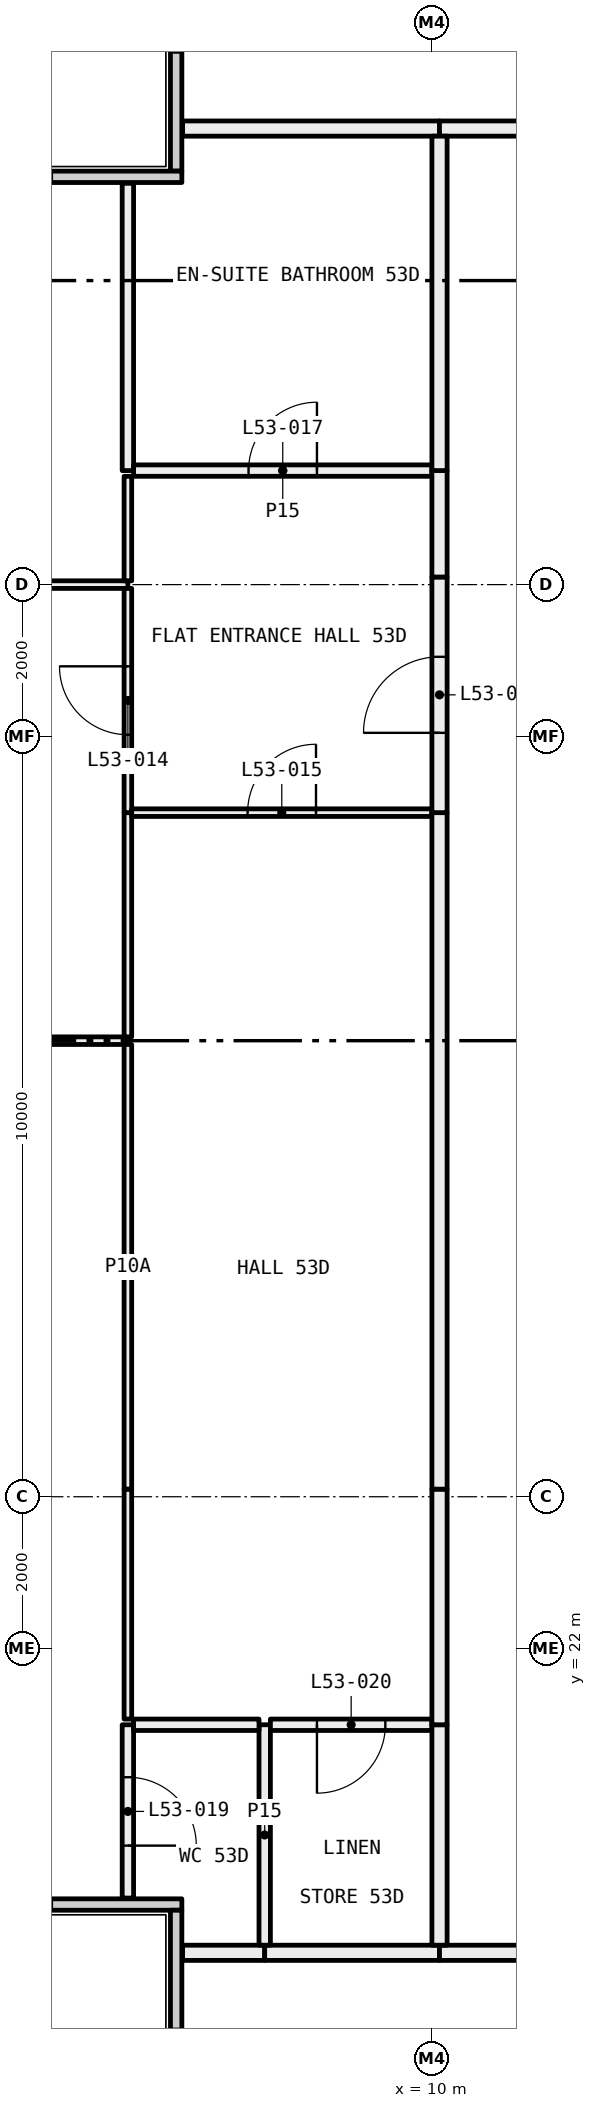
"""IFC4 building model, lengths in metres.
Left out: names, types, materials, properties, quantities, classifications, styles, units other than length and angle.
Written with IfcOpenShell. Run it as: python <this file> out.ifc"""

import sys

from ifc_helpers import new_model, si_unit, direction, frame, frame_2d, origin, place, context, subcontext, project, spatial, rectangle, extrude, element, fill, save


model = new_model("IFC4")
c1 = context("Model", 3, precision=1e-05, world=origin(), true_north=direction((0.0, 1.0)))
c2 = subcontext(c1, "Body", "Model", "MODEL_VIEW")
j1 = project(units=[si_unit("LENGTHUNIT", "METRE"), si_unit("PLANEANGLEUNIT", "RADIAN")], contexts=[c1])
p1 = place(None, origin())
s1 = spatial("IfcSite", under=j1, at=p1, CompositionType="ELEMENT")
p2 = place(p1, origin())
s2 = spatial("IfcBuilding", under=s1, at=p2, CompositionType="ELEMENT")
p3 = place(p2, frame((0.0, 0.0, 199.65)))
s3 = spatial("IfcBuildingStorey", under=s2, at=p3, CompositionType="ELEMENT", Elevation=199.65)
p4 = place(p3, frame((6.635, 41.44, 0.0), z_axis=(0.0, 0.0, 1.0), x_axis=(0.0, 1.0, 0.0)))
e1 = element("IfcWall", 1, at=p4, inside=s3, PredefinedType="ELEMENTEDWALL", context=c2, shape_type="SweptSolid", body=[
    extrude(rectangle(XDim=5.85, YDim=0.15, at=frame_2d((2.925, 0.0))), origin(), (0.0, 0.0, 1.0), 3.05),
])
p5 = place(p4, frame((1.56, 0.0, 0.45)))
e2 = element("IfcOpeningElement", 2, at=p5, cuts=e1, PredefinedType="OPENING", context=c2, shape_type="SweptSolid", body=[
    extrude(rectangle(XDim=4.0, YDim=2.55, at=frame_2d((2.0, 1.275))), frame((0.0, 0.085, 0.0), z_axis=(0.0, -1.0, 0.0), x_axis=(1.0, 0.0, 0.0)), (0.0, 0.0, 1.0), 0.17),
])
p6 = place(p3, frame((0.56, 41.365, 0.0), z_axis=(0.0, 0.0, 1.0), x_axis=(1.0, 0.0, 0.0)))
e3 = element("IfcWall", 3, at=p6, inside=s3, PredefinedType="ELEMENTEDWALL", context=c2, shape_type="SweptSolid", body=[
    extrude(rectangle(XDim=6.15, YDim=0.15, at=frame_2d((3.075, 0.0))), origin(), (0.0, 0.0, 1.0), 3.05),
])
p7 = place(p6, frame((0.44, 0.0, 0.45)))
e4 = element("IfcOpeningElement", 4, at=p7, cuts=e3, PredefinedType="OPENING", context=c2, shape_type="SweptSolid", body=[
    extrude(rectangle(XDim=4.0, YDim=2.55, at=frame_2d((2.0, 1.275))), frame((0.0, 0.085, 0.0), z_axis=(0.0, -1.0, 0.0), x_axis=(1.0, 0.0, 0.0)), (0.0, 0.0, 1.0), 0.17),
])
p8 = place(p3, frame((0.56, 18.635, 0.0), z_axis=(0.0, 0.0, 1.0), x_axis=(1.0, 0.0, 0.0)))
e5 = element("IfcWall", 5, at=p8, inside=s3, PredefinedType="ELEMENTEDWALL", context=c2, shape_type="SweptSolid", body=[
    extrude(rectangle(XDim=6.15, YDim=0.15, at=frame_2d((3.075, 0.0))), origin(), (0.0, 0.0, 1.0), 3.05),
])
p9 = place(p8, frame((0.44, 0.0, 0.45)))
e6 = element("IfcOpeningElement", 6, at=p9, cuts=e5, PredefinedType="OPENING", context=c2, shape_type="SweptSolid", body=[
    extrude(rectangle(XDim=4.0, YDim=2.55, at=frame_2d((2.0, 1.275))), frame((0.0, 0.085, 0.0), z_axis=(0.0, -1.0, 0.0), x_axis=(1.0, 0.0, 0.0)), (0.0, 0.0, 1.0), 0.17),
])
p10 = place(p3, frame((6.635, 12.71, 0.0), z_axis=(0.0, 0.0, 1.0), x_axis=(0.0, 1.0, 0.0)))
e7 = element("IfcWall", 7, at=p10, inside=s3, PredefinedType="ELEMENTEDWALL", context=c2, shape_type="SweptSolid", body=[
    extrude(rectangle(XDim=5.85, YDim=0.15, at=frame_2d((2.925, 0.0))), origin(), (0.0, 0.0, 1.0), 3.05),
])
p11 = place(p10, frame((0.29, 0.0, 0.45)))
e8 = element("IfcOpeningElement", 8, at=p11, cuts=e7, PredefinedType="OPENING", context=c2, shape_type="SweptSolid", body=[
    extrude(rectangle(XDim=4.0, YDim=2.55, at=frame_2d((2.0, 1.275))), frame((0.0, 0.085, 0.0), z_axis=(0.0, -1.0, 0.0), x_axis=(1.0, 0.0, 0.0)), (0.0, 0.0, 1.0), 0.17),
])
p12 = place(p3, frame((7.8, 18.0, 0.0), z_axis=(0.0, 0.0, 1.0), x_axis=(-1.0, 0.0, 0.0)))
e9 = element("IfcWall", 9, at=p12, inside=s3, PredefinedType="PARTITIONING", context=c2, shape_type="SweptSolid", body=[
    extrude(rectangle(XDim=1.08, YDim=0.2, at=frame_2d((0.54, 0.0))), origin(), (0.0, 0.0, 1.0), 3.05),
])
p13 = place(p3, frame((10.1, 18.0, 0.0), z_axis=(0.0, 0.0, 1.0), x_axis=(-1.0, 0.0, 0.0)))
e10 = element("IfcWall", 10, at=p13, inside=s3, PredefinedType="PARTITIONING", context=c2, shape_type="SweptSolid", body=[
    extrude(rectangle(XDim=2.3, YDim=0.2, at=frame_2d((1.15, 0.0))), origin(), (0.0, 0.0, 1.0), 3.05),
])
p14 = place(p3, frame((12.0, 18.0, 0.0), z_axis=(0.0, 0.0, 1.0), x_axis=(-1.0, 0.0, 0.0)))
e11 = element("IfcWall", 11, at=p14, inside=s3, PredefinedType="PARTITIONING", context=c2, shape_type="SweptSolid", body=[
    extrude(rectangle(XDim=1.9, YDim=0.2, at=frame_2d((0.95, 0.0))), origin(), (0.0, 0.0, 1.0), 3.05),
])
p15 = place(p3, frame((6.72, 42.0, 0.0), z_axis=(0.0, 0.0, 1.0), x_axis=(1.0, 0.0, 0.0)))
e12 = element("IfcWall", 12, at=p15, inside=s3, PredefinedType="PARTITIONING", context=c2, shape_type="SweptSolid", body=[
    extrude(rectangle(XDim=3.38, YDim=0.2, at=frame_2d((1.69, 0.0))), origin(), (0.0, 0.0, 1.0), 3.05),
])
p16 = place(p3, frame((10.1, 42.0, 0.0), z_axis=(0.0, 0.0, 1.0), x_axis=(1.0, 0.0, 0.0)))
e13 = element("IfcWall", 13, at=p16, inside=s3, PredefinedType="PARTITIONING", context=c2, shape_type="SweptSolid", body=[
    extrude(rectangle(XDim=7.9, YDim=0.2, at=frame_2d((3.95, 0.0))), origin(), (0.0, 0.0, 1.0), 3.05),
])
p17 = place(p3, frame((6.0, 30.0, 0.0), z_axis=(0.0, 0.0, 1.0), x_axis=(-1.0, 0.0, 0.0)))
e14 = element("IfcWall", 14, at=p17, inside=s3, PredefinedType="PARTITIONING", context=c2, shape_type="SweptSolid", body=[
    extrude(rectangle(XDim=5.28, YDim=0.1, at=frame_2d((2.64, 0.0))), origin(), (0.0, 0.0, 1.0), 3.05),
])
p18 = place(p17, frame((2.19, 0.0, 0.0)))
e15 = element("IfcOpeningElement", 15, at=p18, cuts=e14, PredefinedType="OPENING", context=c2, shape_type="SweptSolid", body=[
    extrude(rectangle(XDim=0.9, YDim=2.1, at=frame_2d((0.45, 1.05))), frame((0.0, 0.06, 0.0), z_axis=(0.0, -1.0, 0.0), x_axis=(1.0, 0.0, 0.0)), (0.0, 0.0, 1.0), 0.12),
])
p19 = place(p3, frame((6.0, 18.72, 0.0), z_axis=(0.0, 0.0, 1.0), x_axis=(0.0, 1.0, 0.0)))
e16 = element("IfcWall", 16, at=p19, inside=s3, PredefinedType="PARTITIONING", context=c2, shape_type="SweptSolid", body=[
    extrude(rectangle(XDim=2.28, YDim=0.15, at=frame_2d((1.14, 0.0))), origin(), (0.0, 0.0, 1.0), 3.05),
])
p20 = place(p19, frame((0.69, 0.0, 0.0)))
e17 = element("IfcOpeningElement", 17, at=p20, cuts=e16, PredefinedType="OPENING", context=c2, shape_type="SweptSolid", body=[
    extrude(rectangle(XDim=0.9, YDim=2.1, at=frame_2d((0.45, 1.05))), frame((0.0, 0.085, 0.0), z_axis=(0.0, -1.0, 0.0), x_axis=(1.0, 0.0, 0.0)), (0.0, 0.0, 1.0), 0.17),
])
p21 = place(p3, frame((6.0, 21.075, 0.0), z_axis=(0.0, 0.0, 1.0), x_axis=(0.0, 1.0, 0.0)))
e18 = element("IfcWall", 18, at=p21, inside=s3, PredefinedType="PARTITIONING", context=c2, shape_type="SweptSolid", body=[
    extrude(rectangle(XDim=3.025, YDim=0.1, at=frame_2d((1.513, 0.0))), origin(), (0.0, 0.0, 1.0), 2.45),
])
p22 = place(p3, frame((6.0, 24.1, 0.0), z_axis=(0.0, 0.0, 1.0), x_axis=(0.0, 1.0, 0.0)))
e19 = element("IfcWall", 19, at=p22, inside=s3, PredefinedType="PARTITIONING", context=c2, shape_type="SweptSolid", body=[
    extrude(rectangle(XDim=5.85, YDim=0.1, at=frame_2d((2.925, 0.0))), origin(), (0.0, 0.0, 1.0), 3.05),
])
p23 = place(p3, frame((6.0, 36.0, 0.0), z_axis=(0.0, 0.0, 1.0), x_axis=(-1.0, 0.0, 0.0)))
e20 = element("IfcWall", 20, at=p23, inside=s3, PredefinedType="PARTITIONING", context=c2, shape_type="SweptSolid", body=[
    extrude(rectangle(XDim=5.28, YDim=0.1, at=frame_2d((2.64, 0.0))), origin(), (0.0, 0.0, 1.0), 2.45),
])
p24 = place(p23, frame((2.19, 0.0, 0.0)))
e21 = element("IfcOpeningElement", 21, at=p24, cuts=e20, PredefinedType="OPENING", context=c2, shape_type="SweptSolid", body=[
    extrude(rectangle(XDim=0.9, YDim=2.1, at=frame_2d((0.45, 1.05))), frame((0.0, 0.06, 0.0), z_axis=(0.0, -1.0, 0.0), x_axis=(1.0, 0.0, 0.0)), (0.0, 0.0, 1.0), 0.12),
])
p25 = place(p3, frame((6.0, 30.05, 0.0), z_axis=(0.0, 0.0, 1.0), x_axis=(0.0, 1.0, 0.0)))
e22 = element("IfcWall", 22, at=p25, inside=s3, PredefinedType="PARTITIONING", context=c2, shape_type="SweptSolid", body=[
    extrude(rectangle(XDim=2.95, YDim=0.1, at=frame_2d((1.475, 0.0))), origin(), (0.0, 0.0, 1.0), 3.05),
])
p26 = place(p3, frame((6.0, 33.0, 0.0), z_axis=(0.0, 0.0, 1.0), x_axis=(0.0, 1.0, 0.0)))
e23 = element("IfcWall", 23, at=p26, inside=s3, PredefinedType="PARTITIONING", context=c2, shape_type="SweptSolid", body=[
    extrude(rectangle(XDim=2.95, YDim=0.1, at=frame_2d((1.475, 0.0))), origin(), (0.0, 0.0, 1.0), 2.45),
])
p27 = place(p26, frame((1.025, 0.0, 0.0)))
e24 = element("IfcOpeningElement", 24, at=p27, cuts=e23, PredefinedType="OPENING", context=c2, shape_type="SweptSolid", body=[
    extrude(rectangle(XDim=0.9, YDim=2.1, at=frame_2d((0.45, 1.05))), frame((0.0, 0.06, 0.0), z_axis=(0.0, -1.0, 0.0), x_axis=(1.0, 0.0, 0.0)), (0.0, 0.0, 1.0), 0.12),
])
p28 = place(p3, frame((6.0, 36.05, 0.0), z_axis=(0.0, 0.0, 1.0), x_axis=(0.0, 1.0, 0.0)))
e25 = element("IfcWall", 25, at=p28, inside=s3, PredefinedType="PARTITIONING", context=c2, shape_type="SweptSolid", body=[
    extrude(rectangle(XDim=1.375, YDim=0.1, at=frame_2d((0.688, 0.0))), origin(), (0.0, 0.0, 1.0), 2.45),
])
p29 = place(p3, frame((6.0, 37.5, 0.0), z_axis=(0.0, 0.0, 1.0), x_axis=(0.0, 1.0, 0.0)))
e26 = element("IfcWall", 26, at=p29, inside=s3, PredefinedType="PARTITIONING", context=c2, shape_type="SweptSolid", body=[
    extrude(rectangle(XDim=3.78, YDim=0.15, at=frame_2d((1.89, 0.0))), origin(), (0.0, 0.0, 1.0), 3.05),
])
p30 = place(p3, frame((7.8, 18.1, 0.0), z_axis=(0.0, 0.0, 1.0), x_axis=(0.0, 1.0, 0.0)))
e27 = element("IfcWall", 27, at=p30, inside=s3, PredefinedType="PARTITIONING", context=c2, shape_type="SweptSolid", body=[
    extrude(rectangle(XDim=2.9, YDim=0.15, at=frame_2d((1.45, 0.0))), origin(), (0.0, 0.0, 1.0), 3.05),
])
p31 = place(p3, frame((7.725, 21.0, 0.0), z_axis=(0.0, 0.0, 1.0), x_axis=(-1.0, 0.0, 0.0)))
e28 = element("IfcWall", 28, at=p31, inside=s3, PredefinedType="PARTITIONING", context=c2, shape_type="SweptSolid", body=[
    extrude(rectangle(XDim=1.65, YDim=0.15, at=frame_2d((0.825, 0.0))), origin(), (0.0, 0.0, 1.0), 3.05),
])
p32 = place(p3, frame((10.0, 21.0, 0.0), z_axis=(0.0, 0.0, 1.0), x_axis=(-1.0, 0.0, 0.0)))
e29 = element("IfcWall", 29, at=p32, inside=s3, PredefinedType="PARTITIONING", context=c2, shape_type="SweptSolid", body=[
    extrude(rectangle(XDim=2.125, YDim=0.15, at=frame_2d((1.062, 0.0))), origin(), (0.0, 0.0, 1.0), 3.05),
])
p33 = place(p32, frame((0.613, 0.0, 0.0)))
e30 = element("IfcOpeningElement", 30, at=p33, cuts=e29, PredefinedType="OPENING", context=c2, shape_type="SweptSolid", body=[
    extrude(rectangle(XDim=0.9, YDim=2.1, at=frame_2d((0.45, 1.05))), frame((0.0, 0.085, 0.0), z_axis=(0.0, -1.0, 0.0), x_axis=(1.0, 0.0, 0.0)), (0.0, 0.0, 1.0), 0.17),
])
p34 = place(p3, frame((10.1, 18.1, 0.0), z_axis=(0.0, 0.0, 1.0), x_axis=(0.0, 1.0, 0.0)))
e31 = element("IfcWall", 31, at=p34, inside=s3, PredefinedType="PARTITIONING", context=c2, shape_type="SweptSolid", body=[
    extrude(rectangle(XDim=2.9, YDim=0.2, at=frame_2d((1.45, 0.0))), origin(), (0.0, 0.0, 1.0), 3.05),
])
p35 = place(p3, frame((10.0, 33.0, 0.0), z_axis=(0.0, 0.0, 1.0), x_axis=(-1.0, 0.0, 0.0)))
e32 = element("IfcWall", 32, at=p35, inside=s3, PredefinedType="PARTITIONING", context=c2, shape_type="SweptSolid", body=[
    extrude(rectangle(XDim=3.95, YDim=0.1, at=frame_2d((1.975, 0.0))), origin(), (0.0, 0.0, 1.0), 3.05),
])
p36 = place(p35, frame((1.525, 0.0, 0.0)))
e33 = element("IfcOpeningElement", 33, at=p36, cuts=e32, PredefinedType="OPENING", context=c2, shape_type="SweptSolid", body=[
    extrude(rectangle(XDim=0.9, YDim=2.1, at=frame_2d((0.45, 1.05))), frame((0.0, 0.06, 0.0), z_axis=(0.0, -1.0, 0.0), x_axis=(1.0, 0.0, 0.0)), (0.0, 0.0, 1.0), 0.12),
])
p37 = place(p3, frame((10.1, 21.0, 0.0), z_axis=(0.0, 0.0, 1.0), x_axis=(0.0, 1.0, 0.0)))
e34 = element("IfcWall", 34, at=p37, inside=s3, PredefinedType="PARTITIONING", context=c2, shape_type="SweptSolid", body=[
    extrude(rectangle(XDim=3.1, YDim=0.2, at=frame_2d((1.55, 0.0))), origin(), (0.0, 0.0, 1.0), 2.45),
])
p38 = place(p3, frame((10.1, 24.1, 0.0), z_axis=(0.0, 0.0, 1.0), x_axis=(0.0, 1.0, 0.0)))
e35 = element("IfcWall", 35, at=p38, inside=s3, PredefinedType="PARTITIONING", context=c2, shape_type="SweptSolid", body=[
    extrude(rectangle(XDim=8.9, YDim=0.2, at=frame_2d((4.45, 0.0))), origin(), (0.0, 0.0, 1.0), 3.05),
])
p39 = place(p3, frame((10.0, 37.5, 0.0), z_axis=(0.0, 0.0, 1.0), x_axis=(-1.0, 0.0, 0.0)))
e36 = element("IfcWall", 36, at=p39, inside=s3, PredefinedType="PARTITIONING", context=c2, shape_type="SweptSolid", body=[
    extrude(rectangle(XDim=3.925, YDim=0.15, at=frame_2d((1.962, 0.0))), origin(), (0.0, 0.0, 1.0), 3.05),
])
p40 = place(p39, frame((1.512, 0.0, 0.0)))
e37 = element("IfcOpeningElement", 37, at=p40, cuts=e36, PredefinedType="OPENING", context=c2, shape_type="SweptSolid", body=[
    extrude(rectangle(XDim=0.9, YDim=2.1, at=frame_2d((0.45, 1.05))), frame((0.0, 0.085, 0.0), z_axis=(0.0, -1.0, 0.0), x_axis=(1.0, 0.0, 0.0)), (0.0, 0.0, 1.0), 0.17),
])
p41 = place(p3, frame((10.1, 33.0, 0.0), z_axis=(0.0, 0.0, 1.0), x_axis=(0.0, 1.0, 0.0)))
e38 = element("IfcWall", 38, at=p41, inside=s3, PredefinedType="PARTITIONING", context=c2, shape_type="SweptSolid", body=[
    extrude(rectangle(XDim=3.1, YDim=0.2, at=frame_2d((1.55, 0.0))), origin(), (0.0, 0.0, 1.0), 2.45),
])
p42 = place(p41, frame((1.05, 0.0, 0.0)))
e39 = element("IfcOpeningElement", 39, at=p42, cuts=e38, PredefinedType="OPENING", context=c2, shape_type="SweptSolid", body=[
    extrude(rectangle(XDim=1.0, YDim=2.1, at=frame_2d((0.5, 1.05))), frame((0.0, 0.11, 0.0), z_axis=(0.0, -1.0, 0.0), x_axis=(1.0, 0.0, 0.0)), (0.0, 0.0, 1.0), 0.22),
])
p43 = place(p3, frame((10.1, 36.1, 0.0), z_axis=(0.0, 0.0, 1.0), x_axis=(0.0, 1.0, 0.0)))
e40 = element("IfcWall", 40, at=p43, inside=s3, PredefinedType="PARTITIONING", context=c2, shape_type="SweptSolid", body=[
    extrude(rectangle(XDim=1.4, YDim=0.2, at=frame_2d((0.7, 0.0))), origin(), (0.0, 0.0, 1.0), 3.05),
])
p44 = place(p3, frame((10.1, 37.5, 0.0), z_axis=(0.0, 0.0, 1.0), x_axis=(0.0, 1.0, 0.0)))
e41 = element("IfcWall", 41, at=p44, inside=s3, PredefinedType="PARTITIONING", context=c2, shape_type="SweptSolid", body=[
    extrude(rectangle(XDim=4.4, YDim=0.2, at=frame_2d((2.2, 0.0))), origin(), (0.0, 0.0, 1.0), 3.05),
])
p45 = place(p42, origin())
e42 = element("IfcDoor", 42, at=p45, inside=s3, OperationType="SINGLE_SWING_RIGHT", PredefinedType="DOOR", context=c2, shape_type="SweptSolid", body=[
    extrude(rectangle(XDim=1.0, YDim=2.1, at=frame_2d((0.5, 1.05))), frame((0.0, 0.025, 0.0), z_axis=(0.0, -1.0, 0.0), x_axis=(1.0, 0.0, 0.0)), (0.0, 0.0, 1.0), 0.05),
])
fill(e39, e42)
p46 = place(p27, origin())
e43 = element("IfcDoor", 43, at=p46, inside=s3, OperationType="SINGLE_SWING_LEFT", PredefinedType="DOOR", context=c2, shape_type="SweptSolid", body=[
    extrude(rectangle(XDim=0.9, YDim=2.1, at=frame_2d((0.45, 1.05))), frame((0.0, 0.025, 0.0), z_axis=(0.0, -1.0, 0.0), x_axis=(1.0, 0.0, 0.0)), (0.0, 0.0, 1.0), 0.05),
])
fill(e24, e43)
p47 = place(p36, frame((0.9, 0.0, 0.0), x_axis=(-1.0, 0.0, 0.0)))
e44 = element("IfcDoor", 44, at=p47, inside=s3, OperationType="SINGLE_SWING_LEFT", PredefinedType="DOOR", context=c2, shape_type="SweptSolid", body=[
    extrude(rectangle(XDim=0.9, YDim=2.1, at=frame_2d((0.45, 1.05))), frame((0.0, 0.025, 0.0), z_axis=(0.0, -1.0, 0.0), x_axis=(1.0, 0.0, 0.0)), (0.0, 0.0, 1.0), 0.05),
])
fill(e33, e44)
p48 = place(p40, frame((0.9, 0.0, 0.0), x_axis=(-1.0, 0.0, 0.0)))
e45 = element("IfcDoor", 45, at=p48, inside=s3, OperationType="SINGLE_SWING_LEFT", PredefinedType="DOOR", context=c2, shape_type="SweptSolid", body=[
    extrude(rectangle(XDim=0.9, YDim=2.1, at=frame_2d((0.45, 1.05))), frame((0.0, 0.025, 0.0), z_axis=(0.0, -1.0, 0.0), x_axis=(1.0, 0.0, 0.0)), (0.0, 0.0, 1.0), 0.05),
])
fill(e37, e45)
p49 = place(p20, frame((0.9, 0.0, 0.0), x_axis=(-1.0, 0.0, 0.0)))
e46 = element("IfcDoor", 46, at=p49, inside=s3, OperationType="SINGLE_SWING_LEFT", PredefinedType="DOOR", context=c2, shape_type="SweptSolid", body=[
    extrude(rectangle(XDim=0.9, YDim=2.1, at=frame_2d((0.45, 1.05))), frame((0.0, 0.025, 0.0), z_axis=(0.0, -1.0, 0.0), x_axis=(1.0, 0.0, 0.0)), (0.0, 0.0, 1.0), 0.05),
])
fill(e17, e46)
p50 = place(p33, origin())
e47 = element("IfcDoor", 47, at=p50, inside=s3, OperationType="SINGLE_SWING_LEFT", PredefinedType="DOOR", context=c2, shape_type="SweptSolid", body=[
    extrude(rectangle(XDim=0.9, YDim=2.1, at=frame_2d((0.45, 1.05))), frame((0.0, 0.025, 0.0), z_axis=(0.0, -1.0, 0.0), x_axis=(1.0, 0.0, 0.0)), (0.0, 0.0, 1.0), 0.05),
])
fill(e30, e47)
save(model, sys.argv[1])
